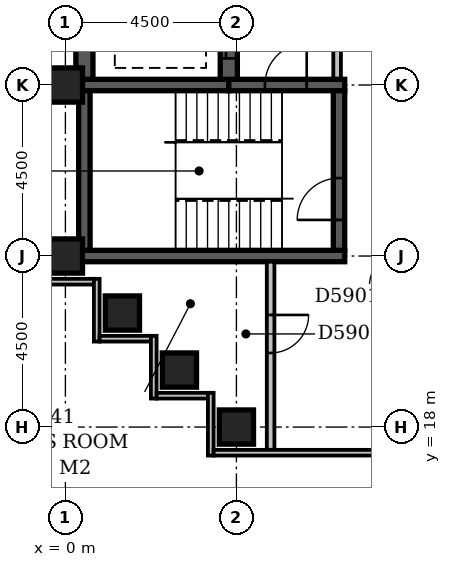
"""IFC4 building model, lengths in metres.
Left out: names, types, materials, properties, quantities, classifications, styles, units other than length and angle.
Written with IfcOpenShell. Run it as: python <this file> out.ifc"""

import sys

from ifc_helpers import new_model, si_unit, direction, frame, frame_2d, origin, origin_2d, place, context, subcontext, project, spatial, rectangle, extrude, element, fill, save


model = new_model("IFC4")
c1 = context("Model", 3, precision=1e-05, world=origin(), true_north=direction((0.0, 1.0)))
c2 = subcontext(c1, "Body", "Model", "MODEL_VIEW")
j1 = project(units=[si_unit("LENGTHUNIT", "METRE"), si_unit("PLANEANGLEUNIT", "RADIAN")], contexts=[c1])
p1 = place(None, origin())
s1 = spatial("IfcSite", under=j1, at=p1, CompositionType="ELEMENT")
p2 = place(p1, origin())
s2 = spatial("IfcBuilding", under=s1, at=p2, CompositionType="ELEMENT")
p3 = place(p2, frame((0.0, 0.0, 229.4)))
s3 = spatial("IfcBuildingStorey", under=s2, at=p3, CompositionType="ELEMENT", Elevation=229.4)
p4 = place(p3, frame((0.35, 22.5, -0.3), z_axis=(0.0, 0.0, 1.0), x_axis=(1.0, 0.0, 0.0)))
e1 = element("IfcWall", 1, at=p4, inside=s3, PredefinedType="SHEAR", context=c2, shape_type="SweptSolid", body=[
    extrude(rectangle(XDim=7.0, YDim=0.3, at=frame_2d((3.5, 0.0))), origin(), (0.0, 0.0, 1.0), 3.55),
])
p5 = place(p3, frame((0.35, 27.0, -0.3), z_axis=(0.0, 0.0, 1.0), x_axis=(1.0, 0.0, 0.0)))
e2 = element("IfcWall", 2, at=p5, inside=s3, PredefinedType="SHEAR", context=c2, shape_type="SweptSolid", body=[
    extrude(rectangle(XDim=3.95, YDim=0.3, at=frame_2d((1.975, 0.0))), origin(), (0.0, 0.0, 1.0), 3.55),
])
p6 = place(p3, frame((0.5, 22.65, -0.3), z_axis=(0.0, 0.0, 1.0), x_axis=(0.0, 1.0, 0.0)))
e3 = element("IfcWall", 3, at=p6, inside=s3, PredefinedType="SHEAR", context=c2, shape_type="SweptSolid", body=[
    extrude(rectangle(XDim=4.2, YDim=0.3, at=frame_2d((2.1, 0.0))), origin(), (0.0, 0.0, 1.0), 3.55),
])
p7 = place(p3, frame((0.5, 27.15, -0.3), z_axis=(0.0, 0.0, 1.0), x_axis=(0.0, 1.0, 0.0)))
e4 = element("IfcWall", 4, at=p7, inside=s3, PredefinedType="SHEAR", context=c2, shape_type="SweptSolid", body=[
    extrude(rectangle(XDim=22.125, YDim=0.45, at=frame_2d((11.062, 0.0))), origin(), (0.0, 0.0, 1.0), 3.55),
])
p8 = place(p3, frame((4.3, 27.0, -0.3), z_axis=(0.0, 0.0, 1.0), x_axis=(1.0, 0.0, 0.0)))
e5 = element("IfcWall", 5, at=p8, inside=s3, PredefinedType="SHEAR", context=c2, shape_type="SweptSolid", body=[
    extrude(rectangle(XDim=3.05, YDim=0.3, at=frame_2d((1.525, 0.0))), origin(), (0.0, 0.0, 1.0), 3.55),
])
p9 = place(p8, frame((0.95, 0.0, 0.3)))
e6 = element("IfcOpeningElement", 6, at=p9, cuts=e5, PredefinedType="OPENING", context=c2, shape_type="SweptSolid", body=[
    extrude(rectangle(XDim=1.1, YDim=2.1, at=frame_2d((0.55, 1.05))), frame((0.0, 0.162, 0.0), z_axis=(0.0, -1.0, 0.0), x_axis=(1.0, 0.0, 0.0)), (0.0, 0.0, 1.0), 0.324),
])
p10 = place(p3, frame((4.3, 27.15, -0.3), z_axis=(0.0, 0.0, 1.0), x_axis=(0.0, 1.0, 0.0)))
e7 = element("IfcWall", 7, at=p10, inside=s3, PredefinedType="SHEAR", context=c2, shape_type="SweptSolid", body=[
    extrude(rectangle(XDim=22.125, YDim=0.45, at=frame_2d((11.062, 0.0))), origin(), (0.0, 0.0, 1.0), 3.55),
])
p11 = place(p10, frame((3.05, 0.0, 0.3)))
e8 = element("IfcOpeningElement", 8, at=p11, cuts=e7, PredefinedType="OPENING", context=c2, shape_type="SweptSolid", body=[
    extrude(rectangle(XDim=1.1, YDim=2.1, at=frame_2d((0.55, 1.05))), frame((0.0, 0.237, 0.0), z_axis=(0.0, -1.0, 0.0), x_axis=(1.0, 0.0, 0.0)), (0.0, 0.0, 1.0), 0.474),
])
p12 = place(p10, frame((0.55, 0.0, 0.3)))
e9 = element("IfcOpeningElement", 9, at=p12, cuts=e7, PredefinedType="OPENING", context=c2, shape_type="SweptSolid", body=[
    extrude(rectangle(XDim=1.1, YDim=2.1, at=frame_2d((0.55, 1.05))), frame((0.0, 0.237, 0.0), z_axis=(0.0, -1.0, 0.0), x_axis=(1.0, 0.0, 0.0)), (0.0, 0.0, 1.0), 0.474),
])
p13 = place(p10, frame((20.55, 0.0, 0.3)))
e10 = element("IfcOpeningElement", 10, at=p13, cuts=e7, PredefinedType="OPENING", context=c2, shape_type="SweptSolid", body=[
    extrude(rectangle(XDim=1.1, YDim=2.1, at=frame_2d((0.55, 1.05))), frame((0.0, 0.237, 0.0), z_axis=(0.0, -1.0, 0.0), x_axis=(1.0, 0.0, 0.0)), (0.0, 0.0, 1.0), 0.474),
])
p14 = place(p10, frame((18.05, 0.0, 0.3)))
e11 = element("IfcOpeningElement", 11, at=p14, cuts=e7, PredefinedType="OPENING", context=c2, shape_type="SweptSolid", body=[
    extrude(rectangle(XDim=1.1, YDim=2.1, at=frame_2d((0.55, 1.05))), frame((0.0, 0.237, 0.0), z_axis=(0.0, -1.0, 0.0), x_axis=(1.0, 0.0, 0.0)), (0.0, 0.0, 1.0), 0.474),
])
p15 = place(p10, frame((15.55, 0.0, 0.3)))
e12 = element("IfcOpeningElement", 12, at=p15, cuts=e7, PredefinedType="OPENING", context=c2, shape_type="SweptSolid", body=[
    extrude(rectangle(XDim=1.1, YDim=2.1, at=frame_2d((0.55, 1.05))), frame((0.0, 0.237, 0.0), z_axis=(0.0, -1.0, 0.0), x_axis=(1.0, 0.0, 0.0)), (0.0, 0.0, 1.0), 0.474),
])
p16 = place(p10, frame((13.05, 0.0, 0.3)))
e13 = element("IfcOpeningElement", 13, at=p16, cuts=e7, PredefinedType="OPENING", context=c2, shape_type="SweptSolid", body=[
    extrude(rectangle(XDim=1.1, YDim=2.1, at=frame_2d((0.55, 1.05))), frame((0.0, 0.237, 0.0), z_axis=(0.0, -1.0, 0.0), x_axis=(1.0, 0.0, 0.0)), (0.0, 0.0, 1.0), 0.474),
])
p17 = place(p10, frame((10.55, 0.0, 0.3)))
e14 = element("IfcOpeningElement", 14, at=p17, cuts=e7, PredefinedType="OPENING", context=c2, shape_type="SweptSolid", body=[
    extrude(rectangle(XDim=1.1, YDim=2.1, at=frame_2d((0.55, 1.05))), frame((0.0, 0.237, 0.0), z_axis=(0.0, -1.0, 0.0), x_axis=(1.0, 0.0, 0.0)), (0.0, 0.0, 1.0), 0.474),
])
p18 = place(p10, frame((8.05, 0.0, 0.3)))
e15 = element("IfcOpeningElement", 15, at=p18, cuts=e7, PredefinedType="OPENING", context=c2, shape_type="SweptSolid", body=[
    extrude(rectangle(XDim=1.1, YDim=2.1, at=frame_2d((0.55, 1.05))), frame((0.0, 0.237, 0.0), z_axis=(0.0, -1.0, 0.0), x_axis=(1.0, 0.0, 0.0)), (0.0, 0.0, 1.0), 0.474),
])
p19 = place(p10, frame((5.55, 0.0, 0.3)))
e16 = element("IfcOpeningElement", 16, at=p19, cuts=e7, PredefinedType="OPENING", context=c2, shape_type="SweptSolid", body=[
    extrude(rectangle(XDim=1.1, YDim=2.1, at=frame_2d((0.55, 1.05))), frame((0.0, 0.237, 0.0), z_axis=(0.0, -1.0, 0.0), x_axis=(1.0, 0.0, 0.0)), (0.0, 0.0, 1.0), 0.474),
])
p20 = place(p3, frame((7.2, 22.65, -0.3), z_axis=(0.0, 0.0, 1.0), x_axis=(0.0, 1.0, 0.0)))
e17 = element("IfcWall", 17, at=p20, inside=s3, PredefinedType="SHEAR", context=c2, shape_type="SweptSolid", body=[
    extrude(rectangle(XDim=4.2, YDim=0.3, at=frame_2d((2.1, 0.0))), origin(), (0.0, 0.0, 1.0), 3.55),
])
p21 = place(p20, frame((0.8, 0.0, 0.3)))
e18 = element("IfcOpeningElement", 18, at=p21, cuts=e17, PredefinedType="OPENING", context=c2, shape_type="SweptSolid", body=[
    extrude(rectangle(XDim=1.1, YDim=2.1, at=frame_2d((0.55, 1.05))), frame((0.0, 0.162, 0.0), z_axis=(0.0, -1.0, 0.0), x_axis=(1.0, 0.0, 0.0)), (0.0, 0.0, 1.0), 0.324),
])
for number, where, z_axis, x_axis in (
    (19, (4.5, 18.0, -0.3), (0.0, 0.0, 1.0), (1.0, 0.0, 0.0)),
    (20, (3.0, 19.5, -0.3), (0.0, 0.0, 1.0), (1.0, 0.0, 0.0)),
    (21, (1.5, 21.0, -0.3), (0.0, 0.0, 1.0), (1.0, 0.0, 0.0)),
    (22, (0.0, 22.5, -0.3), (0.0, 0.0, 1.0), (1.0, 0.0, 0.0)),
    (23, (0.0, 27.0, -0.3), (0.0, 0.0, 1.0), (1.0, 0.0, 0.0)),
):
    element("IfcColumn", number, at=place(p3, frame(where, z_axis=z_axis, x_axis=x_axis)), inside=s3, PredefinedType="COLUMN", context=c2, shape_type="SweptSolid", body=[
        extrude(rectangle(XDim=0.9, YDim=0.9, at=origin_2d()), origin(), (0.0, 0.0, 1.0), 3.55),
    ])
p22 = place(p3, frame((-0.6, 21.825, 0.0), z_axis=(0.0, 0.0, 1.0), x_axis=(1.0, 0.0, 0.0)))
e24 = element("IfcWall", 24, at=p22, inside=s3, PredefinedType="STANDARD", context=c2, shape_type="SweptSolid", body=[
    extrude(rectangle(XDim=1.35, YDim=0.15, at=frame_2d((0.675, 0.0))), origin(), (0.0, 0.0, 1.0), 2.7),
])
p23 = place(p3, frame((0.825, 21.9, 0.0), z_axis=(0.0, 0.0, 1.0), x_axis=(0.0, -1.0, 0.0)))
e25 = element("IfcWall", 25, at=p23, inside=s3, PredefinedType="STANDARD", context=c2, shape_type="SweptSolid", body=[
    extrude(rectangle(XDim=1.65, YDim=0.15, at=frame_2d((0.825, 0.0))), origin(), (0.0, 0.0, 1.0), 2.7),
])
p24 = place(p3, frame((0.9, 20.325, 0.0), z_axis=(0.0, 0.0, 1.0), x_axis=(1.0, 0.0, 0.0)))
e26 = element("IfcWall", 26, at=p24, inside=s3, PredefinedType="STANDARD", context=c2, shape_type="SweptSolid", body=[
    extrude(rectangle(XDim=1.35, YDim=0.15, at=frame_2d((0.675, 0.0))), origin(), (0.0, 0.0, 1.0), 2.7),
])
p25 = place(p3, frame((2.325, 20.4, 0.0), z_axis=(0.0, 0.0, 1.0), x_axis=(0.0, -1.0, 0.0)))
e27 = element("IfcWall", 27, at=p25, inside=s3, PredefinedType="STANDARD", context=c2, shape_type="SweptSolid", body=[
    extrude(rectangle(XDim=1.65, YDim=0.15, at=frame_2d((0.825, 0.0))), origin(), (0.0, 0.0, 1.0), 2.7),
])
p26 = place(p3, frame((2.4, 18.825, 0.0), z_axis=(0.0, 0.0, 1.0), x_axis=(1.0, 0.0, 0.0)))
e28 = element("IfcWall", 28, at=p26, inside=s3, PredefinedType="STANDARD", context=c2, shape_type="SweptSolid", body=[
    extrude(rectangle(XDim=1.35, YDim=0.15, at=frame_2d((0.675, 0.0))), origin(), (0.0, 0.0, 1.0), 2.7),
])
p27 = place(p3, frame((3.825, 18.9, 0.0), z_axis=(0.0, 0.0, 1.0), x_axis=(0.0, -1.0, 0.0)))
e29 = element("IfcWall", 29, at=p27, inside=s3, PredefinedType="STANDARD", context=c2, shape_type="SweptSolid", body=[
    extrude(rectangle(XDim=1.65, YDim=0.15, at=frame_2d((0.825, 0.0))), origin(), (0.0, 0.0, 1.0), 2.7),
])
p28 = place(p3, frame((3.9, 17.325, 0.0), z_axis=(0.0, 0.0, 1.0), x_axis=(1.0, 0.0, 0.0)))
e30 = element("IfcWall", 30, at=p28, inside=s3, PredefinedType="STANDARD", context=c2, shape_type="SweptSolid", body=[
    extrude(rectangle(XDim=19.35, YDim=0.15, at=frame_2d((9.675, 0.0))), origin(), (0.0, 0.0, 1.0), 2.7),
])
p29 = place(p28, frame((6.15, 0.0, 0.6)))
e31 = element("IfcOpeningElement", 31, at=p29, cuts=e30, PredefinedType="OPENING", context=c2, shape_type="SweptSolid", body=[
    extrude(rectangle(XDim=2.4, YDim=1.8, at=frame_2d((1.2, 0.9))), frame((0.0, 0.087, 0.0), z_axis=(0.0, -1.0, 0.0), x_axis=(1.0, 0.0, 0.0)), (0.0, 0.0, 1.0), 0.174),
])
p30 = place(p28, frame((14.881, 0.0, 0.6)))
e32 = element("IfcOpeningElement", 32, at=p30, cuts=e30, PredefinedType="OPENING", context=c2, shape_type="SweptSolid", body=[
    extrude(rectangle(XDim=1.2, YDim=1.8, at=frame_2d((0.6, 0.9))), frame((0.0, 0.087, 0.0), z_axis=(0.0, -1.0, 0.0), x_axis=(1.0, 0.0, 0.0)), (0.0, 0.0, 1.0), 0.174),
])
p31 = place(p3, frame((7.15, 27.17, 0.0), z_axis=(0.0, 0.0, 1.0), x_axis=(0.0, 1.0, 0.0)))
e33 = element("IfcWall", 33, at=p31, inside=s3, PredefinedType="PARTITIONING", context=c2, shape_type="SweptSolid", body=[
    extrude(rectangle(XDim=4.83, YDim=0.2, at=frame_2d((2.415, 0.0))), origin(), (0.0, 0.0, 1.0), 3.25),
])
p32 = place(p31, frame((1.73, 0.0, 0.0)))
e34 = element("IfcOpeningElement", 34, at=p32, cuts=e33, PredefinedType="OPENING", context=c2, shape_type="SweptSolid", body=[
    extrude(rectangle(XDim=1.2, YDim=2.1, at=frame_2d((0.6, 1.05))), frame((0.0, 0.112, 0.0), z_axis=(0.0, -1.0, 0.0), x_axis=(1.0, 0.0, 0.0)), (0.0, 0.0, 1.0), 0.224),
])
p33 = place(p3, frame((5.4, 17.4, 0.0), z_axis=(0.0, 0.0, 1.0), x_axis=(0.0, 1.0, 0.0)))
e35 = element("IfcWall", 35, at=p33, inside=s3, PredefinedType="PARTITIONING", context=c2, shape_type="SweptSolid", body=[
    extrude(rectangle(XDim=4.95, YDim=0.2, at=frame_2d((2.475, 0.0))), origin(), (0.0, 0.0, 1.0), 3.25),
])
p34 = place(p33, frame((2.55, 0.0, 0.0)))
e36 = element("IfcOpeningElement", 36, at=p34, cuts=e35, PredefinedType="OPENING", context=c2, shape_type="SweptSolid", body=[
    extrude(rectangle(XDim=1.0, YDim=2.1, at=frame_2d((0.5, 1.05))), frame((0.0, 0.112, 0.0), z_axis=(0.0, -1.0, 0.0), x_axis=(1.0, 0.0, 0.0)), (0.0, 0.0, 1.0), 0.224),
])
p35 = place(p12, origin())
e37 = element("IfcDoor", 37, at=p35, inside=s3, OperationType="SLIDING_TO_LEFT", PredefinedType="DOOR", context=c2, shape_type="SweptSolid", body=[
    extrude(rectangle(XDim=1.1, YDim=2.1, at=frame_2d((0.55, 1.05))), frame((0.0, 0.025, 0.0), z_axis=(0.0, -1.0, 0.0), x_axis=(1.0, 0.0, 0.0)), (0.0, 0.0, 1.0), 0.05),
])
fill(e9, e37)
p36 = place(p9, frame((1.1, 0.0, 0.0), z_axis=(0.0, 0.0, 1.0), x_axis=(-1.0, 0.0, 0.0)))
e38 = element("IfcDoor", 38, at=p36, inside=s3, OperationType="SINGLE_SWING_LEFT", PredefinedType="DOOR", context=c2, shape_type="SweptSolid", body=[
    extrude(rectangle(XDim=1.1, YDim=2.1, at=frame_2d((0.55, 1.05))), frame((0.0, 0.025, 0.0), z_axis=(0.0, -1.0, 0.0), x_axis=(1.0, 0.0, 0.0)), (0.0, 0.0, 1.0), 0.05),
])
fill(e6, e38)
p37 = place(p21, origin())
e39 = element("IfcDoor", 39, at=p37, inside=s3, OperationType="SINGLE_SWING_LEFT", PredefinedType="DOOR", context=c2, shape_type="SweptSolid", body=[
    extrude(rectangle(XDim=1.1, YDim=2.1, at=frame_2d((0.55, 1.05))), frame((0.0, 0.025, 0.0), z_axis=(0.0, -1.0, 0.0), x_axis=(1.0, 0.0, 0.0)), (0.0, 0.0, 1.0), 0.05),
])
fill(e18, e39)
p38 = place(p34, origin())
e40 = element("IfcDoor", 40, at=p38, inside=s3, OperationType="SINGLE_SWING_RIGHT", PredefinedType="DOOR", context=c2, shape_type="SweptSolid", body=[
    extrude(rectangle(XDim=1.0, YDim=2.1, at=frame_2d((0.5, 1.05))), frame((0.0, 0.025, 0.0), z_axis=(0.0, -1.0, 0.0), x_axis=(1.0, 0.0, 0.0)), (0.0, 0.0, 1.0), 0.05),
])
fill(e36, e40)
save(model, sys.argv[1])
